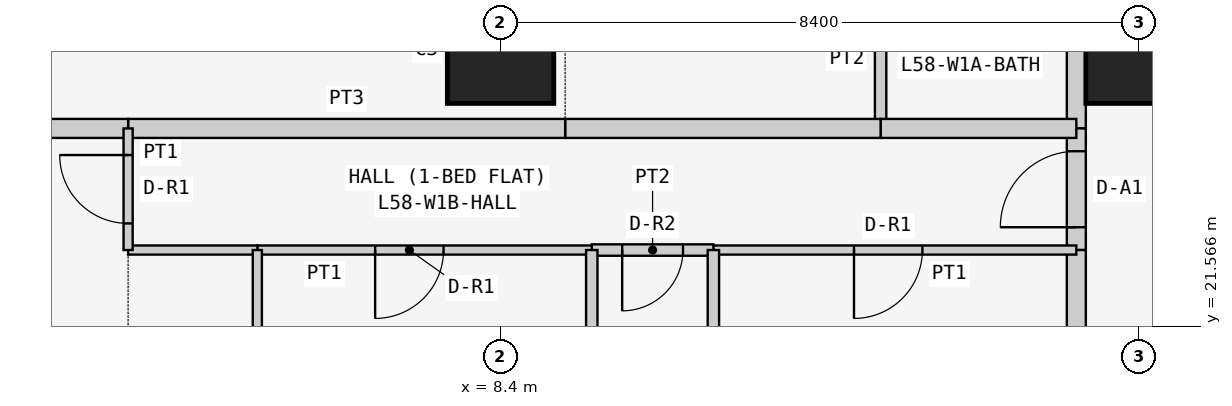
"""IFC4 building model, lengths in metres.
Left out: names, types, materials, properties, quantities, classifications, styles, units other than length and angle.
Written with IfcOpenShell. Run it as: python <this file> out.ifc"""

import sys

from ifc_helpers import new_model, si_unit, direction, frame, frame_2d, origin, origin_2d, place, context, subcontext, project, spatial, rectangle, extrude, element, fill, save


model = new_model("IFC4")
c1 = context("Model", 3, precision=1e-05, world=origin(), true_north=direction((0.0, 1.0)))
c2 = subcontext(c1, "Body", "Model", "MODEL_VIEW")
j1 = project(units=[si_unit("LENGTHUNIT", "METRE"), si_unit("PLANEANGLEUNIT", "RADIAN")], contexts=[c1])
p1 = place(None, origin())
s1 = spatial("IfcSite", under=j1, at=p1, CompositionType="ELEMENT")
p2 = place(p1, origin())
s2 = spatial("IfcBuilding", under=s1, at=p2, CompositionType="ELEMENT")
p3 = place(p2, frame((0.0, 0.0, 222.9)))
s3 = spatial("IfcBuildingStorey", under=s2, at=p3, CompositionType="ELEMENT", Elevation=222.9)
for number, where, z_axis, x_axis in (
    (1, (8.4, 25.2, 0.0), (0.0, 0.0, 1.0), (1.0, 0.0, 0.0)),
    (2, (16.8, 25.2, 0.0), (0.0, 0.0, 1.0), (1.0, 0.0, 0.0)),
):
    element("IfcColumn", number, at=place(p3, frame(where, z_axis=z_axis, x_axis=x_axis)), inside=s3, PredefinedType="COLUMN", context=c2, shape_type="SweptSolid", body=[
        extrude(rectangle(XDim=1.4, YDim=1.4, at=origin_2d()), origin(), (0.0, 0.0, 1.0), 3.6),
    ])
p4 = place(p3, frame((15.975, 24.171, 0.0), z_axis=(0.0, 0.0, 1.0), x_axis=(0.0, 1.0, 0.0)))
e3 = element("IfcWall", 3, at=p4, inside=s3, PredefinedType="PARTITIONING", context=c2, shape_type="SweptSolid", body=[
    extrude(rectangle(XDim=2.629, YDim=0.25, at=frame_2d((1.314, 0.0))), origin(), (0.0, 0.0, 1.0), 3.45),
])
p5 = place(p3, frame((15.975, 22.571, 0.0), z_axis=(0.0, 0.0, 1.0), x_axis=(0.0, 1.0, 0.0)))
e4 = element("IfcWall", 4, at=p5, inside=s3, PredefinedType="PARTITIONING", context=c2, shape_type="SweptSolid", body=[
    extrude(rectangle(XDim=1.6, YDim=0.25, at=frame_2d((0.8, 0.0))), origin(), (0.0, 0.0, 1.0), 3.45),
])
p6 = place(p5, frame((0.3, 0.0, 0.0)))
e5 = element("IfcOpeningElement", 5, at=p6, cuts=e4, PredefinedType="OPENING", context=c2, shape_type="SweptSolid", body=[
    extrude(rectangle(XDim=1.0, YDim=2.1, at=frame_2d((0.5, 1.05))), frame((0.0, 0.135, 0.0), z_axis=(0.0, -1.0, 0.0), x_axis=(1.0, 0.0, 0.0)), (0.0, 0.0, 1.0), 0.27),
])
p7 = place(p3, frame((15.975, 16.1, 0.0), z_axis=(0.0, 0.0, 1.0), x_axis=(0.0, 1.0, 0.0)))
e6 = element("IfcWall", 6, at=p7, inside=s3, PredefinedType="PARTITIONING", context=c2, shape_type="SweptSolid", body=[
    extrude(rectangle(XDim=6.471, YDim=0.25, at=frame_2d((3.235, 0.0))), origin(), (0.0, 0.0, 1.0), 3.45),
])
p8 = place(p3, frame((13.4, 26.8, 0.0), z_axis=(0.0, 0.0, 1.0), x_axis=(0.0, -1.0, 0.0)))
e7 = element("IfcWall", 7, at=p8, inside=s3, PredefinedType="PARTITIONING", context=c2, shape_type="SweptSolid", body=[
    extrude(rectangle(XDim=2.629, YDim=0.15, at=frame_2d((1.314, 0.0))), origin(), (0.0, 0.0, 1.0), 3.45),
])
p9 = place(p3, frame((13.4, 24.171, 0.0), z_axis=(0.0, 0.0, 1.0), x_axis=(1.0, 0.0, 0.0)))
e8 = element("IfcWall", 8, at=p9, inside=s3, PredefinedType="PARTITIONING", context=c2, shape_type="SweptSolid", body=[
    extrude(rectangle(XDim=2.575, YDim=0.25, at=frame_2d((1.288, 0.0))), origin(), (0.0, 0.0, 1.0), 3.45),
])
p10 = place(p3, frame((9.25, 24.171, 0.0), z_axis=(0.0, 0.0, 1.0), x_axis=(1.0, 0.0, 0.0)))
e9 = element("IfcWall", 9, at=p10, inside=s3, PredefinedType="PARTITIONING", context=c2, shape_type="SweptSolid", body=[
    extrude(rectangle(XDim=4.15, YDim=0.25, at=frame_2d((2.075, 0.0))), origin(), (0.0, 0.0, 1.0), 3.45),
])
p11 = place(p3, frame((3.5, 24.171, 0.0), z_axis=(0.0, 0.0, 1.0), x_axis=(1.0, 0.0, 0.0)))
e10 = element("IfcWall", 10, at=p11, inside=s3, PredefinedType="PARTITIONING", context=c2, shape_type="SweptSolid", body=[
    extrude(rectangle(XDim=5.75, YDim=0.25, at=frame_2d((2.875, 0.0))), origin(), (0.0, 0.0, 1.0), 3.45),
])
p12 = place(p3, frame((-0.65, 24.171, 0.0), z_axis=(0.0, 0.0, 1.0), x_axis=(1.0, 0.0, 0.0)))
e11 = element("IfcWall", 11, at=p12, inside=s3, PredefinedType="PARTITIONING", context=c2, shape_type="SweptSolid", body=[
    extrude(rectangle(XDim=4.15, YDim=0.25, at=frame_2d((2.075, 0.0))), origin(), (0.0, 0.0, 1.0), 3.45),
])
p13 = place(p3, frame((11.2, 22.571, 0.0), z_axis=(0.0, 0.0, 1.0), x_axis=(1.0, 0.0, 0.0)))
e12 = element("IfcWall", 12, at=p13, inside=s3, PredefinedType="PARTITIONING", context=c2, shape_type="SweptSolid", body=[
    extrude(rectangle(XDim=4.775, YDim=0.12, at=frame_2d((2.388, 0.0))), origin(), (0.0, 0.0, 1.0), 3.45),
])
p14 = place(p13, frame((1.85, 0.0, 0.0)))
e13 = element("IfcOpeningElement", 13, at=p14, cuts=e12, PredefinedType="OPENING", context=c2, shape_type="SweptSolid", body=[
    extrude(rectangle(XDim=0.9, YDim=2.1, at=frame_2d((0.45, 1.05))), frame((0.0, 0.07, 0.0), z_axis=(0.0, -1.0, 0.0), x_axis=(1.0, 0.0, 0.0)), (0.0, 0.0, 1.0), 0.14),
])
p15 = place(p3, frame((9.6, 22.571, 0.0), z_axis=(0.0, 0.0, 1.0), x_axis=(1.0, 0.0, 0.0)))
e14 = element("IfcWall", 14, at=p15, inside=s3, PredefinedType="PARTITIONING", context=c2, shape_type="SweptSolid", body=[
    extrude(rectangle(XDim=1.6, YDim=0.15, at=frame_2d((0.8, 0.0))), origin(), (0.0, 0.0, 1.0), 3.45),
])
p16 = place(p15, frame((0.4, 0.0, 0.0)))
e15 = element("IfcOpeningElement", 15, at=p16, cuts=e14, PredefinedType="OPENING", context=c2, shape_type="SweptSolid", body=[
    extrude(rectangle(XDim=0.8, YDim=2.1, at=frame_2d((0.4, 1.05))), frame((0.0, 0.085, 0.0), z_axis=(0.0, -1.0, 0.0), x_axis=(1.0, 0.0, 0.0)), (0.0, 0.0, 1.0), 0.17),
])
p17 = place(p3, frame((5.2, 22.571, 0.0), z_axis=(0.0, 0.0, 1.0), x_axis=(1.0, 0.0, 0.0)))
e16 = element("IfcWall", 16, at=p17, inside=s3, PredefinedType="PARTITIONING", context=c2, shape_type="SweptSolid", body=[
    extrude(rectangle(XDim=4.4, YDim=0.12, at=frame_2d((2.2, 0.0))), origin(), (0.0, 0.0, 1.0), 3.45),
])
p18 = place(p17, frame((1.55, 0.0, 0.0)))
e17 = element("IfcOpeningElement", 17, at=p18, cuts=e16, PredefinedType="OPENING", context=c2, shape_type="SweptSolid", body=[
    extrude(rectangle(XDim=0.9, YDim=2.1, at=frame_2d((0.45, 1.05))), frame((0.0, 0.07, 0.0), z_axis=(0.0, -1.0, 0.0), x_axis=(1.0, 0.0, 0.0)), (0.0, 0.0, 1.0), 0.14),
])
p19 = place(p3, frame((3.5, 22.571, 0.0), z_axis=(0.0, 0.0, 1.0), x_axis=(1.0, 0.0, 0.0)))
e18 = element("IfcWall", 18, at=p19, inside=s3, PredefinedType="PARTITIONING", context=c2, shape_type="SweptSolid", body=[
    extrude(rectangle(XDim=1.7, YDim=0.12, at=frame_2d((0.85, 0.0))), origin(), (0.0, 0.0, 1.0), 3.45),
])
p20 = place(p3, frame((3.5, 24.171, 0.0), z_axis=(0.0, 0.0, 1.0), x_axis=(0.0, -1.0, 0.0)))
e19 = element("IfcWall", 19, at=p20, inside=s3, PredefinedType="PARTITIONING", context=c2, shape_type="SweptSolid", body=[
    extrude(rectangle(XDim=1.6, YDim=0.12, at=frame_2d((0.8, 0.0))), origin(), (0.0, 0.0, 1.0), 3.45),
])
p21 = place(p20, frame((0.35, 0.0, 0.0)))
e20 = element("IfcOpeningElement", 20, at=p21, cuts=e19, PredefinedType="OPENING", context=c2, shape_type="SweptSolid", body=[
    extrude(rectangle(XDim=0.9, YDim=2.1, at=frame_2d((0.45, 1.05))), frame((0.0, 0.07, 0.0), z_axis=(0.0, -1.0, 0.0), x_axis=(1.0, 0.0, 0.0)), (0.0, 0.0, 1.0), 0.14),
])
for number, where, z_axis, x_axis in (
    (21, (11.2, 22.571, 0.0), (0.0, 0.0, 1.0), (0.0, -1.0, 0.0)),
    (22, (9.6, 22.571, 0.0), (0.0, 0.0, 1.0), (0.0, -1.0, 0.0)),
):
    element("IfcWall", number, at=place(p3, frame(where, z_axis=z_axis, x_axis=x_axis)), inside=s3, PredefinedType="PARTITIONING", context=c2, shape_type="SweptSolid", body=[
        extrude(rectangle(XDim=6.471, YDim=0.15, at=frame_2d((3.235, 0.0))), origin(), (0.0, 0.0, 1.0), 3.45),
    ])
p22 = place(p3, frame((5.2, 22.571, 0.0), z_axis=(0.0, 0.0, 1.0), x_axis=(0.0, -1.0, 0.0)))
e23 = element("IfcWall", 23, at=p22, inside=s3, PredefinedType="PARTITIONING", context=c2, shape_type="SweptSolid", body=[
    extrude(rectangle(XDim=6.471, YDim=0.12, at=frame_2d((3.235, 0.0))), origin(), (0.0, 0.0, 1.0), 3.45),
])
p23 = place(p6, origin())
e24 = element("IfcDoor", 24, at=p23, inside=s3, OperationType="SINGLE_SWING_LEFT", PredefinedType="DOOR", context=c2, shape_type="SweptSolid", body=[
    extrude(rectangle(XDim=1.0, YDim=2.1, at=frame_2d((0.5, 1.05))), frame((0.0, 0.025, 0.0), z_axis=(0.0, -1.0, 0.0), x_axis=(1.0, 0.0, 0.0)), (0.0, 0.0, 1.0), 0.05),
])
fill(e5, e24)
p24 = place(p14, frame((0.9, 0.0, 0.0), z_axis=(0.0, 0.0, 1.0), x_axis=(-1.0, 0.0, 0.0)))
e25 = element("IfcDoor", 25, at=p24, inside=s3, OperationType="SINGLE_SWING_RIGHT", PredefinedType="DOOR", context=c2, shape_type="SweptSolid", body=[
    extrude(rectangle(XDim=0.9, YDim=2.1, at=frame_2d((0.45, 1.05))), frame((0.0, 0.025, 0.0), z_axis=(0.0, -1.0, 0.0), x_axis=(1.0, 0.0, 0.0)), (0.0, 0.0, 1.0), 0.05),
])
fill(e13, e25)
p25 = place(p16, frame((0.8, 0.0, 0.0), z_axis=(0.0, 0.0, 1.0), x_axis=(-1.0, 0.0, 0.0)))
e26 = element("IfcDoor", 26, at=p25, inside=s3, OperationType="SINGLE_SWING_RIGHT", PredefinedType="DOOR", context=c2, shape_type="SweptSolid", body=[
    extrude(rectangle(XDim=0.8, YDim=2.1, at=frame_2d((0.4, 1.05))), frame((0.0, 0.025, 0.0), z_axis=(0.0, -1.0, 0.0), x_axis=(1.0, 0.0, 0.0)), (0.0, 0.0, 1.0), 0.05),
])
fill(e15, e26)
p26 = place(p18, frame((0.9, 0.0, 0.0), z_axis=(0.0, 0.0, 1.0), x_axis=(-1.0, 0.0, 0.0)))
e27 = element("IfcDoor", 27, at=p26, inside=s3, OperationType="SINGLE_SWING_RIGHT", PredefinedType="DOOR", context=c2, shape_type="SweptSolid", body=[
    extrude(rectangle(XDim=0.9, YDim=2.1, at=frame_2d((0.45, 1.05))), frame((0.0, 0.025, 0.0), z_axis=(0.0, -1.0, 0.0), x_axis=(1.0, 0.0, 0.0)), (0.0, 0.0, 1.0), 0.05),
])
fill(e17, e27)
p27 = place(p21, frame((0.9, 0.0, 0.0), z_axis=(0.0, 0.0, 1.0), x_axis=(-1.0, 0.0, 0.0)))
e28 = element("IfcDoor", 28, at=p27, inside=s3, OperationType="SINGLE_SWING_RIGHT", PredefinedType="DOOR", context=c2, shape_type="SweptSolid", body=[
    extrude(rectangle(XDim=0.9, YDim=2.1, at=frame_2d((0.45, 1.05))), frame((0.0, 0.025, 0.0), z_axis=(0.0, -1.0, 0.0), x_axis=(1.0, 0.0, 0.0)), (0.0, 0.0, 1.0), 0.05),
])
fill(e20, e28)
save(model, sys.argv[1])
